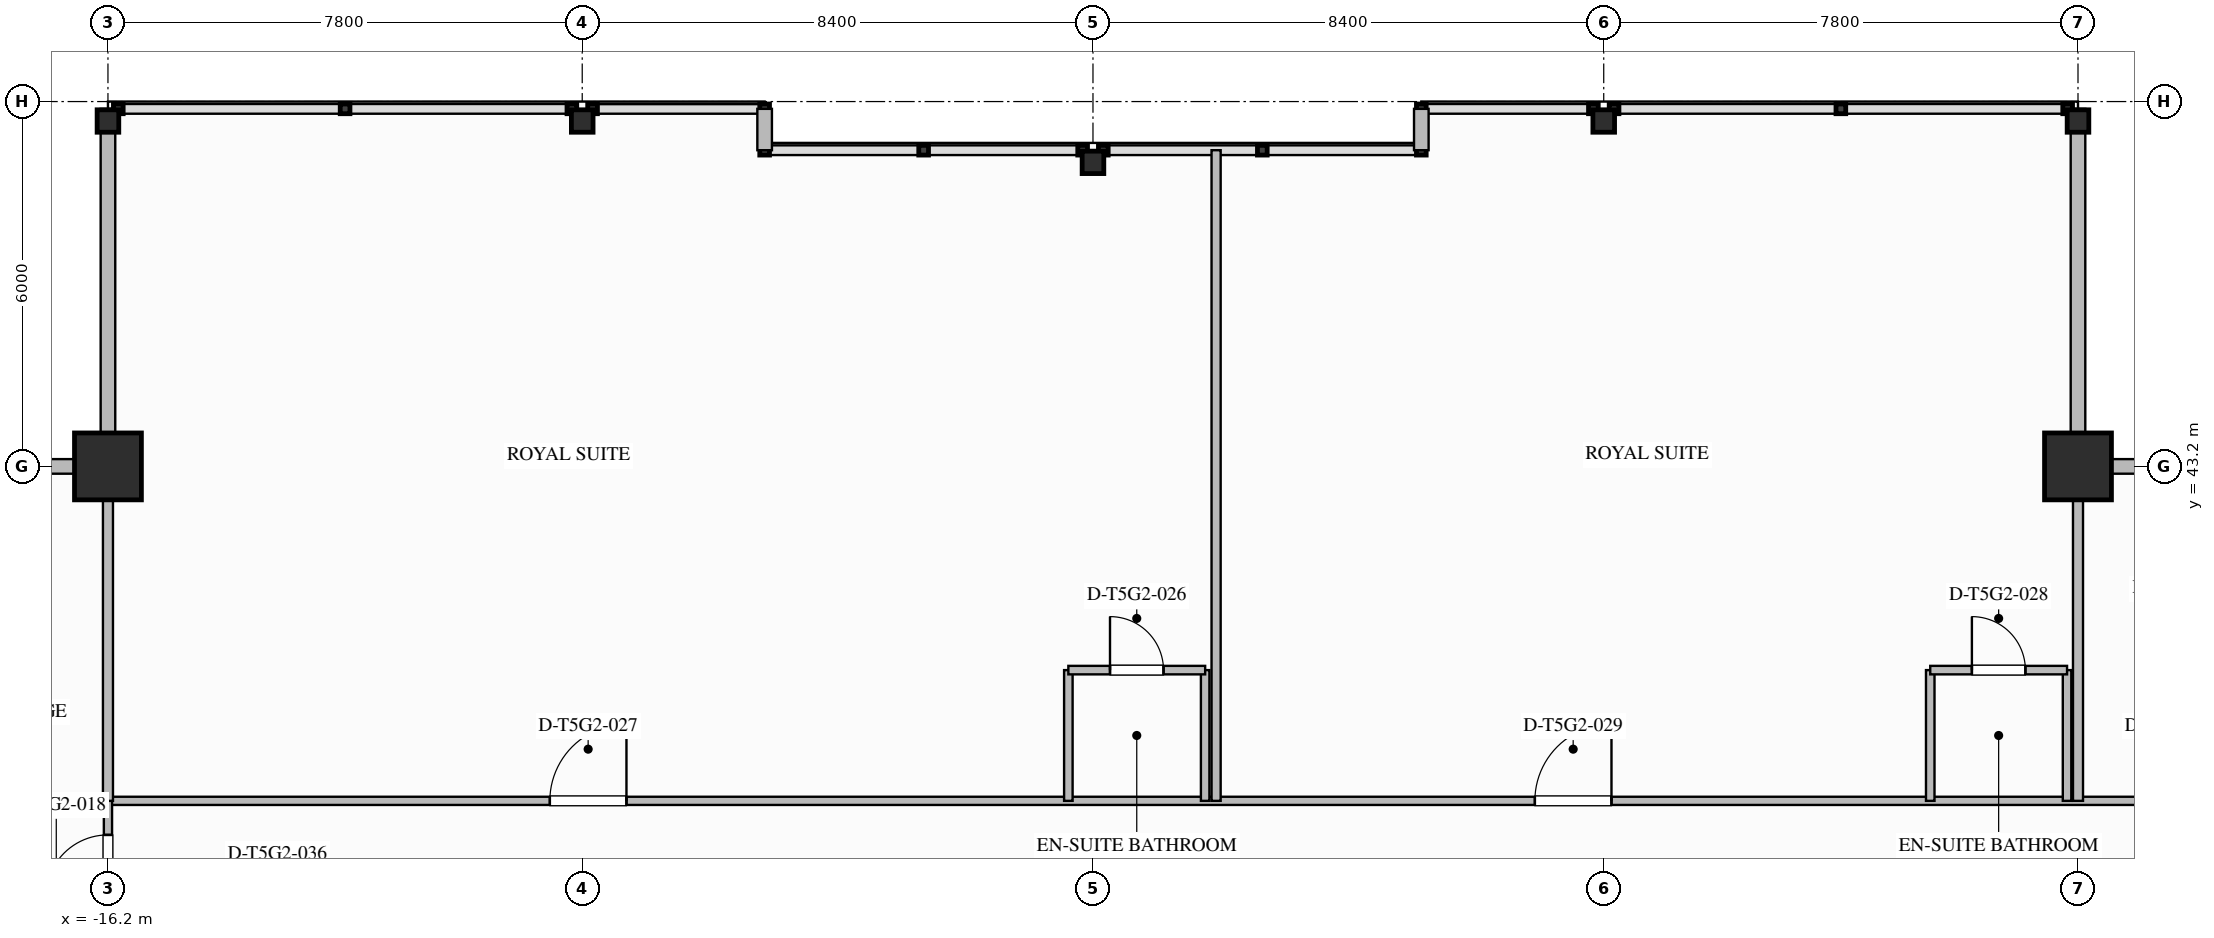
"""IFC4 building model, lengths in metres.
Left out: names, types, materials, properties, quantities, classifications, styles, units other than length and angle.
Written with IfcOpenShell. Run it as: python <this file> out.ifc"""

import sys

from ifc_helpers import new_model, si_unit, direction, frame, frame_2d, origin, origin_2d, place, context, subcontext, project, spatial, rectangle, i_section, extrude, element, fill, save


model = new_model("IFC4")
c1 = context("Model", 3, precision=1e-05, world=origin(), true_north=direction((0.0, 1.0)))
c2 = subcontext(c1, "Body", "Model", "MODEL_VIEW")
j1 = project(units=[si_unit("LENGTHUNIT", "METRE"), si_unit("PLANEANGLEUNIT", "RADIAN")], contexts=[c1])
p1 = place(None, origin())
s1 = spatial("IfcSite", under=j1, at=p1, CompositionType="ELEMENT")
p2 = place(p1, origin())
s2 = spatial("IfcBuilding", under=s1, at=p2, CompositionType="ELEMENT")
p3 = place(p2, frame((0.0, 0.0, 275.95)))
s3 = spatial("IfcBuildingStorey", under=s2, at=p3, CompositionType="ELEMENT", Elevation=275.95)
for number, where, z_axis, x_axis in (
    (1, (-16.2, 43.2, 0.0), (0.0, 0.0, 1.0), (1.0, 0.0, 0.0)),
    (2, (16.2, 43.2, 0.0), (0.0, 0.0, 1.0), (1.0, 0.0, 0.0)),
):
    element("IfcColumn", number, at=place(p3, frame(where, z_axis=z_axis, x_axis=x_axis)), inside=s3, PredefinedType="COLUMN", context=c2, shape_type="SweptSolid", body=[
        extrude(rectangle(XDim=1.1, YDim=1.1, at=origin_2d()), origin(), (0.0, 0.0, 1.0), 3.65),
    ])
for number, where, z_axis, x_axis in (
    (3, (-16.2, 48.88, 0.0), (0.0, 0.0, 1.0), (0.0, 1.0, 0.0)),
    (4, (-8.4, 48.88, 0.0), (0.0, 0.0, 1.0), (0.0, 1.0, 0.0)),
    (5, (0.0, 48.2, 0.0), (0.0, 0.0, 1.0), (0.0, 1.0, 0.0)),
    (6, (8.4, 48.88, 0.0), (0.0, 0.0, 1.0), (0.0, 1.0, 0.0)),
    (7, (16.2, 48.88, 0.0), (0.0, 0.0, 1.0), (0.0, 1.0, 0.0)),
):
    element("IfcColumn", number, at=place(p3, frame(where, z_axis=z_axis, x_axis=x_axis)), inside=s3, PredefinedType="COLUMN", context=c2, shape_type="SweptSolid", body=[
        extrude(i_section(OverallWidth=0.369, OverallDepth=0.356, WebThickness=0.011, FlangeThickness=0.018, FilletRadius=0.025, at=origin_2d()), origin(), (0.0, 0.0, 1.0), 3.647),
    ])
for number, where, z_axis, x_axis in (
    (8, (-22.08, 43.2, 0.0), (0.0, 0.0, 1.0), (1.0, 0.0, 0.0)),
    (9, (-16.2, 43.2, 0.0), (0.0, 0.0, 1.0), (0.0, 1.0, 0.0)),
    (10, (16.2, 49.08, 0.0), (0.0, 0.0, 1.0), (0.0, -1.0, 0.0)),
    (11, (16.2, 43.2, 0.0), (0.0, 0.0, 1.0), (1.0, 0.0, 0.0)),
):
    element("IfcWall", number, at=place(p3, frame(where, z_axis=z_axis, x_axis=x_axis)), inside=s3, PredefinedType="STANDARD", context=c2, shape_type="SweptSolid", body=[
        extrude(rectangle(XDim=5.88, YDim=0.24, at=frame_2d((2.94, 0.0))), origin(), (0.0, 0.0, 1.0), 2.779),
    ])
for number, where, z_axis, x_axis in (
    (12, (-5.4, 49.08, 0.0), (0.0, 0.0, 1.0), (0.0, -1.0, 0.0)),
    (13, (5.4, 48.4, 0.0), (0.0, 0.0, 1.0), (0.0, 1.0, 0.0)),
):
    element("IfcWall", number, at=place(p3, frame(where, z_axis=z_axis, x_axis=x_axis)), inside=s3, PredefinedType="STANDARD", context=c2, shape_type="SweptSolid", body=[
        extrude(rectangle(XDim=0.68, YDim=0.24, at=frame_2d((0.34, 0.0))), origin(), (0.0, 0.0, 1.0), 3.39),
    ])
p4 = place(p3, frame((-16.2, 37.7, 0.0), z_axis=(0.0, 0.0, 1.0), x_axis=(1.0, 0.0, 0.0)))
e14 = element("IfcWall", 14, at=p4, inside=s3, PredefinedType="PARTITIONING", context=c2, shape_type="SweptSolid", body=[
    extrude(rectangle(XDim=38.28, YDim=0.135, at=frame_2d((19.14, 0.0))), origin(), (0.0, 0.0, 1.0), 3.39),
])
p5 = place(p4, frame((33.355, 0.0, 0.0)))
e15 = element("IfcOpeningElement", 15, at=p5, cuts=e14, PredefinedType="OPENING", context=c2, shape_type="SweptSolid", body=[
    extrude(rectangle(XDim=1.26, YDim=2.2, at=frame_2d((0.63, 1.1))), frame((0.0, 0.077, 0.0), z_axis=(0.0, -1.0, 0.0), x_axis=(1.0, 0.0, 0.0)), (0.0, 0.0, 1.0), 0.155),
])
p6 = place(p4, frame((7.268, 0.0, 0.0)))
e16 = element("IfcOpeningElement", 16, at=p6, cuts=e14, PredefinedType="OPENING", context=c2, shape_type="SweptSolid", body=[
    extrude(rectangle(XDim=1.26, YDim=2.2, at=frame_2d((0.63, 1.1))), frame((0.0, 0.077, 0.0), z_axis=(0.0, -1.0, 0.0), x_axis=(1.0, 0.0, 0.0)), (0.0, 0.0, 1.0), 0.155),
])
p7 = place(p4, frame((23.468, 0.0, 0.0)))
e17 = element("IfcOpeningElement", 17, at=p7, cuts=e14, PredefinedType="OPENING", context=c2, shape_type="SweptSolid", body=[
    extrude(rectangle(XDim=1.26, YDim=2.2, at=frame_2d((0.63, 1.1))), frame((0.0, 0.077, 0.0), z_axis=(0.0, -1.0, 0.0), x_axis=(1.0, 0.0, 0.0)), (0.0, 0.0, 1.0), 0.155),
])
p8 = place(p3, frame((-16.2, 35.6, 0.0), z_axis=(0.0, 0.0, 1.0), x_axis=(0.0, 1.0, 0.0)))
e18 = element("IfcWall", 18, at=p8, inside=s3, PredefinedType="PARTITIONING", context=c2, shape_type="SweptSolid", body=[
    extrude(rectangle(XDim=2.1, YDim=0.135, at=frame_2d((1.05, 0.0))), origin(), (0.0, 0.0, 1.0), 2.764),
])
p9 = place(p8, frame((0.52, 0.0, 0.0)))
e19 = element("IfcOpeningElement", 19, at=p9, cuts=e18, PredefinedType="OPENING", context=c2, shape_type="SweptSolid", body=[
    extrude(rectangle(XDim=1.02, YDim=2.15, at=frame_2d((0.51, 1.075))), frame((0.0, 0.077, 0.0), z_axis=(0.0, -1.0, 0.0), x_axis=(1.0, 0.0, 0.0)), (0.0, 0.0, 1.0), 0.155),
])
for number, where, z_axis, x_axis in (
    (20, (-16.2, 37.7, 0.0), (0.0, 0.0, 1.0), (0.0, 1.0, 0.0)),
    (21, (16.2, 37.7, 0.0), (0.0, 0.0, 1.0), (0.0, 1.0, 0.0)),
):
    element("IfcWall", number, at=place(p3, frame(where, z_axis=z_axis, x_axis=x_axis)), inside=s3, PredefinedType="PARTITIONING", context=c2, shape_type="SweptSolid", body=[
        extrude(rectangle(XDim=5.38, YDim=0.165, at=frame_2d((2.69, 0.0))), origin(), (0.0, 0.0, 1.0), 2.764),
    ])
for number, where, z_axis, x_axis in (
    (22, (-0.405, 37.7, 0.0), (0.0, 0.0, 1.0), (0.0, 1.0, 0.0)),
    (23, (1.845, 37.7, 0.0), (0.0, 0.0, 1.0), (0.0, 1.0, 0.0)),
):
    element("IfcWall", number, at=place(p3, frame(where, z_axis=z_axis, x_axis=x_axis)), inside=s3, PredefinedType="PLUMBINGWALL", context=c2, shape_type="SweptSolid", body=[
        extrude(rectangle(XDim=2.15, YDim=0.14, at=frame_2d((1.075, 0.0))), origin(), (0.0, 0.0, 1.0), 3.39),
    ])
p10 = place(p3, frame((-0.405, 39.85, 0.0), z_axis=(0.0, 0.0, 1.0), x_axis=(1.0, 0.0, 0.0)))
e24 = element("IfcWall", 24, at=p10, inside=s3, PredefinedType="PLUMBINGWALL", context=c2, shape_type="SweptSolid", body=[
    extrude(rectangle(XDim=2.25, YDim=0.14, at=frame_2d((1.125, 0.0))), origin(), (0.0, 0.0, 1.0), 3.39),
])
p11 = place(p10, frame((0.685, 0.0, 0.0)))
e25 = element("IfcOpeningElement", 25, at=p11, cuts=e24, PredefinedType="OPENING", context=c2, shape_type="SweptSolid", body=[
    extrude(rectangle(XDim=0.88, YDim=2.1, at=frame_2d((0.44, 1.05))), frame((0.0, 0.08, 0.0), z_axis=(0.0, -1.0, 0.0), x_axis=(1.0, 0.0, 0.0)), (0.0, 0.0, 1.0), 0.16),
])
p12 = place(p3, frame((2.025, 37.7, 0.0), z_axis=(0.0, 0.0, 1.0), x_axis=(0.0, 1.0, 0.0)))
e26 = element("IfcWall", 26, at=p12, inside=s3, PredefinedType="PARTITIONING", context=c2, shape_type="SweptSolid", body=[
    extrude(rectangle(XDim=10.7, YDim=0.15, at=frame_2d((5.35, 0.0))), origin(), (0.0, 0.0, 1.0), 3.39),
])
p13 = place(p3, frame((13.77, 37.7, 0.0), z_axis=(0.0, 0.0, 1.0), x_axis=(0.0, 1.0, 0.0)))
e27 = element("IfcWall", 27, at=p13, inside=s3, PredefinedType="PLUMBINGWALL", context=c2, shape_type="SweptSolid", body=[
    extrude(rectangle(XDim=2.15, YDim=0.14, at=frame_2d((1.075, 0.0))), origin(), (0.0, 0.0, 1.0), 3.39),
])
p14 = place(p3, frame((16.02, 37.7, 0.0), z_axis=(0.0, 0.0, 1.0), x_axis=(0.0, 1.0, 0.0)))
e28 = element("IfcWall", 28, at=p14, inside=s3, PredefinedType="PLUMBINGWALL", context=c2, shape_type="SweptSolid", body=[
    extrude(rectangle(XDim=2.15, YDim=0.14, at=frame_2d((1.075, 0.0))), origin(), (0.0, 0.0, 1.0), 2.764),
])
p15 = place(p3, frame((13.77, 39.85, 0.0), z_axis=(0.0, 0.0, 1.0), x_axis=(1.0, 0.0, 0.0)))
e29 = element("IfcWall", 29, at=p15, inside=s3, PredefinedType="PLUMBINGWALL", context=c2, shape_type="SweptSolid", body=[
    extrude(rectangle(XDim=2.25, YDim=0.14, at=frame_2d((1.125, 0.0))), origin(), (0.0, 0.0, 1.0), 3.39),
])
p16 = place(p15, frame((0.685, 0.0, 0.0)))
e30 = element("IfcOpeningElement", 30, at=p16, cuts=e29, PredefinedType="OPENING", context=c2, shape_type="SweptSolid", body=[
    extrude(rectangle(XDim=0.88, YDim=2.1, at=frame_2d((0.44, 1.05))), frame((0.0, 0.08, 0.0), z_axis=(0.0, -1.0, 0.0), x_axis=(1.0, 0.0, 0.0)), (0.0, 0.0, 1.0), 0.16),
])
p17 = place(p9, origin())
e31 = element("IfcDoor", 31, at=p17, inside=s3, OperationType="SINGLE_SWING_LEFT", PredefinedType="DOOR", context=c2, shape_type="SweptSolid", body=[
    extrude(rectangle(XDim=1.02, YDim=2.15, at=frame_2d((0.51, 1.075))), frame((0.0, 0.025, 0.0), z_axis=(0.0, -1.0, 0.0), x_axis=(1.0, 0.0, 0.0)), (0.0, 0.0, 1.0), 0.05),
])
fill(e19, e31)
p18 = place(p11, origin())
e32 = element("IfcDoor", 32, at=p18, inside=s3, OperationType="SINGLE_SWING_LEFT", PredefinedType="DOOR", context=c2, shape_type="SweptSolid", body=[
    extrude(rectangle(XDim=0.88, YDim=2.1, at=frame_2d((0.44, 1.05))), frame((0.0, 0.025, 0.0), z_axis=(0.0, -1.0, 0.0), x_axis=(1.0, 0.0, 0.0)), (0.0, 0.0, 1.0), 0.05),
])
fill(e25, e32)
p19 = place(p6, origin())
e33 = element("IfcDoor", 33, at=p19, inside=s3, OperationType="SINGLE_SWING_RIGHT", PredefinedType="DOOR", context=c2, shape_type="SweptSolid", body=[
    extrude(rectangle(XDim=1.26, YDim=2.2, at=frame_2d((0.63, 1.1))), frame((0.0, 0.025, 0.0), z_axis=(0.0, -1.0, 0.0), x_axis=(1.0, 0.0, 0.0)), (0.0, 0.0, 1.0), 0.05),
])
fill(e16, e33)
p20 = place(p16, origin())
e34 = element("IfcDoor", 34, at=p20, inside=s3, OperationType="SINGLE_SWING_LEFT", PredefinedType="DOOR", context=c2, shape_type="SweptSolid", body=[
    extrude(rectangle(XDim=0.88, YDim=2.1, at=frame_2d((0.44, 1.05))), frame((0.0, 0.025, 0.0), z_axis=(0.0, -1.0, 0.0), x_axis=(1.0, 0.0, 0.0)), (0.0, 0.0, 1.0), 0.05),
])
fill(e30, e34)
p21 = place(p7, origin())
e35 = element("IfcDoor", 35, at=p21, inside=s3, OperationType="SINGLE_SWING_RIGHT", PredefinedType="DOOR", context=c2, shape_type="SweptSolid", body=[
    extrude(rectangle(XDim=1.26, YDim=2.2, at=frame_2d((0.63, 1.1))), frame((0.0, 0.025, 0.0), z_axis=(0.0, -1.0, 0.0), x_axis=(1.0, 0.0, 0.0)), (0.0, 0.0, 1.0), 0.05),
])
fill(e17, e35)
save(model, sys.argv[1])
